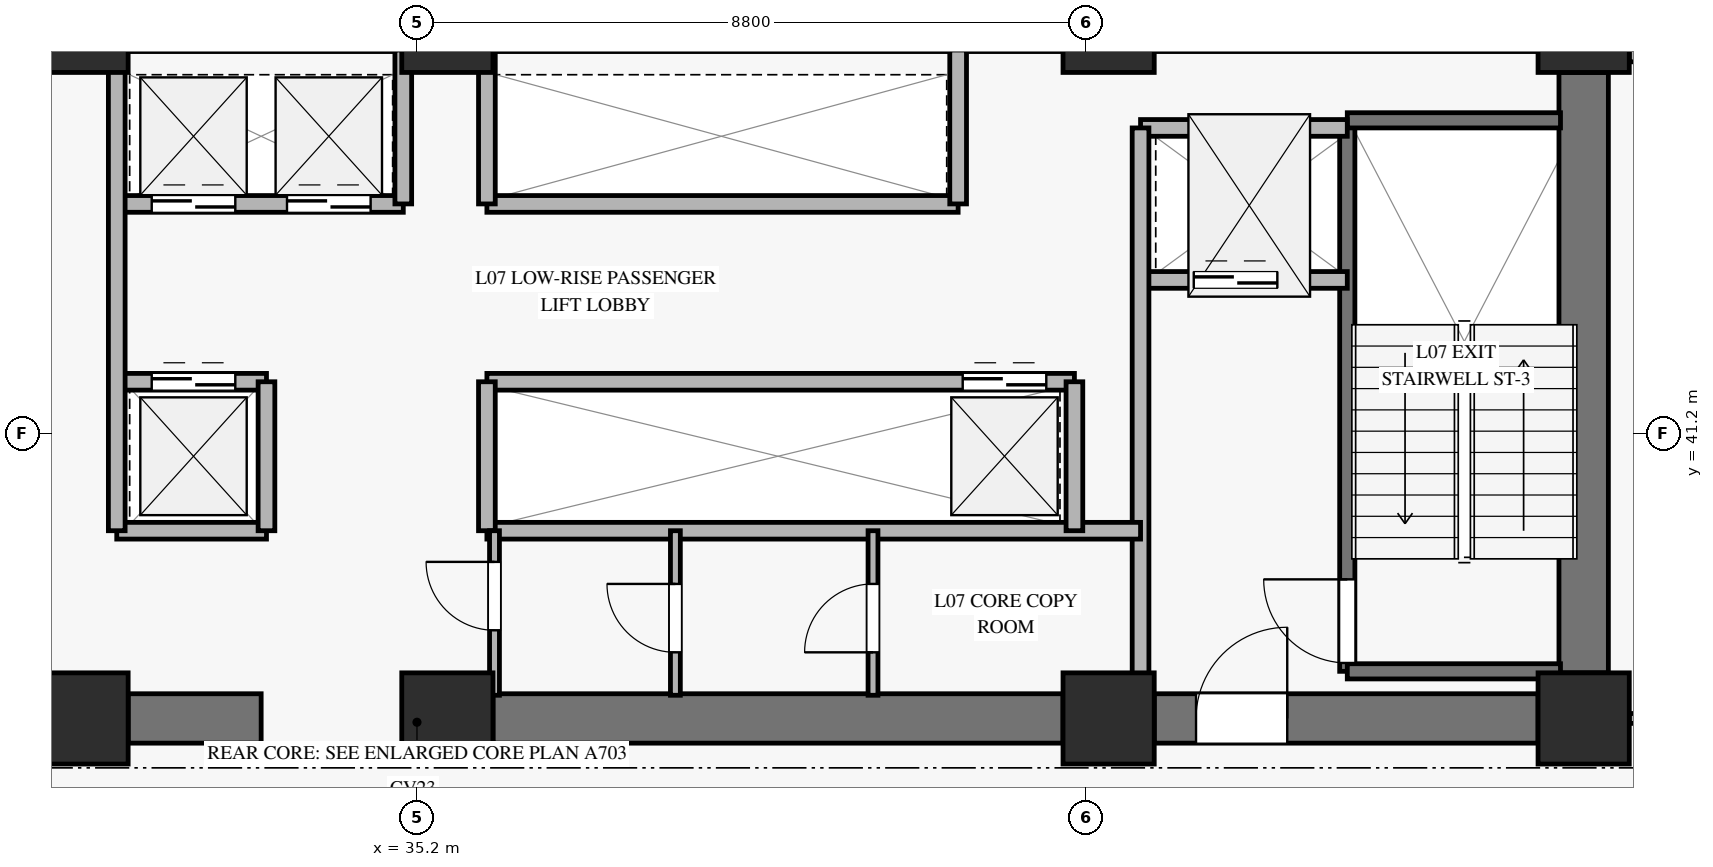
"""IFC4 building model, lengths in metres.
Left out: names, types, materials, properties, quantities, classifications, styles, units other than length and angle.
Written with IfcOpenShell. Run it as: python <this file> out.ifc"""

import sys

from ifc_helpers import new_model, si_unit, direction, frame, frame_2d, origin, origin_2d, place, context, subcontext, project, spatial, rectangle, extrude, source, transform, mapped, element, fill, save


model = new_model("IFC4")
c1 = context("Model", 3, precision=1e-05, world=origin(), true_north=direction((0.0, 1.0)))
c2 = subcontext(c1, "Body", "Model", "MODEL_VIEW")
j1 = project(units=[si_unit("LENGTHUNIT", "METRE"), si_unit("PLANEANGLEUNIT", "RADIAN")], contexts=[c1])
p1 = place(None, origin())
s1 = spatial("IfcSite", under=j1, at=p1, CompositionType="ELEMENT")
p2 = place(p1, origin())
s2 = spatial("IfcBuilding", under=s1, at=p2, CompositionType="ELEMENT")
p3 = place(p2, frame((0.0, 0.0, 29.3)))
s3 = spatial("IfcBuildingStorey", under=s2, at=p3, CompositionType="ELEMENT", Elevation=29.3)
m1 = source(origin(), c2, "Body", "SweptSolid", [
    extrude(rectangle(XDim=1.2, YDim=1.2, at=origin_2d()), origin(), (0.0, 0.0, 1.0), 3.68),
])
for number, where, z_axis, x_axis in (
    (1, (30.8, 37.45, 0.0), (0.0, 0.0, 1.0), (1.0, 0.0, 0.0)),
    (2, (30.8, 46.55, 0.0), (0.0, 0.0, 1.0), (1.0, 0.0, 0.0)),
    (3, (35.6, 37.45, 0.0), (0.0, 0.0, 1.0), (1.0, 0.0, 0.0)),
    (4, (35.6, 46.55, 0.0), (0.0, 0.0, 1.0), (1.0, 0.0, 0.0)),
    (5, (44.3, 37.45, 0.0), (0.0, 0.0, 1.0), (1.0, 0.0, 0.0)),
    (6, (44.3, 46.55, 0.0), (0.0, 0.0, 1.0), (1.0, 0.0, 0.0)),
    (7, (50.55, 37.45, 0.0), (0.0, 0.0, 1.0), (1.0, 0.0, 0.0)),
    (8, (50.55, 46.55, 0.0), (0.0, 0.0, 1.0), (1.0, 0.0, 0.0)),
):
    element("IfcColumn", number, at=place(p3, frame(where, z_axis=z_axis, x_axis=x_axis)), inside=s3, PredefinedType="PILASTER", context=c2, shape_type="MappedRepresentation", body=[
        mapped(m1, transform((0.0, 0.0, 0.0), x_axis=(1.0, 0.0, 0.0), y_axis=(0.0, 1.0, 0.0), z_axis=(0.0, 0.0, 1.0), scale=1.0)),
    ])
p4 = place(p3, frame((31.4, 37.45, 0.0), z_axis=(0.0, 0.0, 1.0), x_axis=(1.0, 0.0, 0.0)))
e9 = element("IfcWall", 9, at=p4, inside=s3, PredefinedType="SHEAR", context=c2, shape_type="SweptSolid", body=[
    extrude(rectangle(XDim=1.75, YDim=0.65, at=frame_2d((0.875, 0.0))), origin(), (0.0, 0.0, 1.0), 3.68),
])
p5 = place(p3, frame((36.2, 37.45, 0.0), z_axis=(0.0, 0.0, 1.0), x_axis=(1.0, 0.0, 0.0)))
e10 = element("IfcWall", 10, at=p5, inside=s3, PredefinedType="SHEAR", context=c2, shape_type="SweptSolid", body=[
    extrude(rectangle(XDim=7.5, YDim=0.65, at=frame_2d((3.75, 0.0))), origin(), (0.0, 0.0, 1.0), 3.68),
])
p6 = place(p3, frame((44.9, 37.45, 0.0), z_axis=(0.0, 0.0, 1.0), x_axis=(1.0, 0.0, 0.0)))
e11 = element("IfcWall", 11, at=p6, inside=s3, PredefinedType="SHEAR", context=c2, shape_type="SweptSolid", body=[
    extrude(rectangle(XDim=5.05, YDim=0.65, at=frame_2d((2.525, 0.0))), origin(), (0.0, 0.0, 1.0), 3.68),
])
p7 = place(p6, frame((0.55, 0.0, 0.0)))
e12 = element("IfcOpeningElement", 12, at=p7, cuts=e11, PredefinedType="OPENING", context=c2, shape_type="SweptSolid", body=[
    extrude(rectangle(XDim=1.2, YDim=2.15, at=frame_2d((0.6, 1.075))), frame((0.0, 0.335, 0.0), z_axis=(0.0, -1.0, 0.0), x_axis=(1.0, 0.0, 0.0)), (0.0, 0.0, 1.0), 0.67),
])
p8 = place(p3, frame((50.55, 38.05, 0.0), z_axis=(0.0, 0.0, 1.0), x_axis=(0.0, 1.0, 0.0)))
e13 = element("IfcWall", 13, at=p8, inside=s3, PredefinedType="SHEAR", context=c2, shape_type="SweptSolid", body=[
    extrude(rectangle(XDim=7.9, YDim=0.65, at=frame_2d((3.95, 0.0))), origin(), (0.0, 0.0, 1.0), 3.68),
])
p9 = place(p3, frame((51.15, 46.25, 0.0), z_axis=(0.0, 0.0, 1.0), x_axis=(1.0, 0.0, 0.0)))
e14 = element("IfcWall", 14, at=p9, inside=s3, PredefinedType="SOLIDWALL", context=c2, shape_type="SweptSolid", body=[
    extrude(rectangle(XDim=12.4, YDim=0.32, at=frame_2d((6.2, 0.0))), origin(), (0.0, 0.0, 1.0), 3.16),
])
p10 = place(p9, frame((5.4, 0.0, 0.45)))
e15 = element("IfcOpeningElement", 15, at=p10, cuts=e14, PredefinedType="OPENING", context=c2, shape_type="SweptSolid", body=[
    extrude(rectangle(XDim=1.6, YDim=2.0, at=frame_2d((0.8, 1.0))), frame((0.0, 0.17, 0.0), z_axis=(0.0, -1.0, 0.0), x_axis=(1.0, 0.0, 0.0)), (0.0, 0.0, 1.0), 0.34),
])
p11 = place(p3, frame((47.44, 38.07, 0.0), z_axis=(0.0, 0.0, 1.0), x_axis=(0.0, 1.0, 0.0)))
e16 = element("IfcWall", 16, at=p11, inside=s3, PredefinedType="SOLIDWALL", context=c2, shape_type="SweptSolid", body=[
    extrude(rectangle(XDim=7.25, YDim=0.2, at=frame_2d((3.625, 0.0))), origin(), (0.0, 0.0, 1.0), 3.9),
])
p12 = place(p11, frame((0.11, 0.0, 0.0)))
e17 = element("IfcOpeningElement", 17, at=p12, cuts=e16, PredefinedType="OPENING", context=c2, shape_type="SweptSolid", body=[
    extrude(rectangle(XDim=1.1, YDim=2.15, at=frame_2d((0.55, 1.075))), frame((0.0, 0.11, 0.0), z_axis=(0.0, -1.0, 0.0), x_axis=(1.0, 0.0, 0.0)), (0.0, 0.0, 1.0), 0.22),
])
for number, where, z_axis, x_axis in (
    (18, (47.44, 45.32, 0.0), (0.0, 0.0, 1.0), (1.0, 0.0, 0.0)),
    (19, (47.44, 38.07, 0.0), (0.0, 0.0, 1.0), (1.0, 0.0, 0.0)),
):
    element("IfcWall", number, at=place(p3, frame(where, z_axis=z_axis, x_axis=x_axis)), inside=s3, PredefinedType="SOLIDWALL", context=c2, shape_type="SweptSolid", body=[
        extrude(rectangle(XDim=2.805, YDim=0.2, at=frame_2d((1.403, 0.0))), origin(), (0.0, 0.0, 1.0), 3.9),
    ])
p13 = place(p3, frame((44.72, 43.22, 0.0), z_axis=(0.0, 0.0, 1.0), x_axis=(1.0, 0.0, 0.0)))
e20 = element("IfcWall", 20, at=p13, inside=s3, PredefinedType="SOLIDWALL", context=c2, shape_type="SweptSolid", body=[
    extrude(rectangle(XDim=2.72, YDim=0.22, at=frame_2d((1.36, 0.0))), origin(), (0.0, 0.0, 1.0), 3.68),
])
p14 = place(p13, frame((0.7, 0.0, 0.0)))
e21 = element("IfcOpeningElement", 21, at=p14, cuts=e20, PredefinedType="OPENING", context=c2, shape_type="SweptSolid", body=[
    extrude(rectangle(XDim=1.1, YDim=2.2, at=frame_2d((0.55, 1.1))), frame((0.0, 0.12, 0.0), z_axis=(0.0, -1.0, 0.0), x_axis=(1.0, 0.0, 0.0)), (0.0, 0.0, 1.0), 0.24),
])
p15 = place(p3, frame((44.72, 45.22, 0.0), z_axis=(0.0, 0.0, 1.0), x_axis=(1.0, 0.0, 0.0)))
e22 = element("IfcWall", 22, at=p15, inside=s3, PredefinedType="SOLIDWALL", context=c2, shape_type="SweptSolid", body=[
    extrude(rectangle(XDim=2.72, YDim=0.22, at=frame_2d((1.36, 0.0))), origin(), (0.0, 0.0, 1.0), 3.68),
])
p16 = place(p3, frame((44.72, 37.755, 0.0), z_axis=(0.0, 0.0, 1.0), x_axis=(0.0, 1.0, 0.0)))
e23 = element("IfcWall", 23, at=p16, inside=s3, PredefinedType="SOLIDWALL", context=c2, shape_type="SweptSolid", body=[
    extrude(rectangle(XDim=7.465, YDim=0.22, at=frame_2d((3.732, 0.0))), origin(), (0.0, 0.0, 1.0), 3.68),
])
p17 = place(p3, frame((31.25, 44.22, 0.0), z_axis=(0.0, 0.0, 1.0), x_axis=(1.0, 0.0, 0.0)))
e24 = element("IfcWall", 24, at=p17, inside=s3, PredefinedType="SOLIDWALL", context=c2, shape_type="SweptSolid", body=[
    extrude(rectangle(XDim=3.77, YDim=0.22, at=frame_2d((1.885, 0.0))), origin(), (0.0, 0.0, 1.0), 3.68),
])
p18 = place(p17, frame((0.46, 0.0, 0.0)))
e25 = element("IfcOpeningElement", 25, at=p18, cuts=e24, PredefinedType="OPENING", context=c2, shape_type="SweptSolid", body=[
    extrude(rectangle(XDim=1.1, YDim=2.2, at=frame_2d((0.55, 1.1))), frame((0.0, 0.12, 0.0), z_axis=(0.0, -1.0, 0.0), x_axis=(1.0, 0.0, 0.0)), (0.0, 0.0, 1.0), 0.24),
])
p19 = place(p17, frame((2.24, 0.0, 0.0)))
e26 = element("IfcOpeningElement", 26, at=p19, cuts=e24, PredefinedType="OPENING", context=c2, shape_type="SweptSolid", body=[
    extrude(rectangle(XDim=1.1, YDim=2.2, at=frame_2d((0.55, 1.1))), frame((0.0, 0.12, 0.0), z_axis=(0.0, -1.0, 0.0), x_axis=(1.0, 0.0, 0.0)), (0.0, 0.0, 1.0), 0.24),
])
p20 = place(p3, frame((36.12, 44.22, 0.0), z_axis=(0.0, 0.0, 1.0), x_axis=(1.0, 0.0, 0.0)))
e27 = element("IfcWall", 27, at=p20, inside=s3, PredefinedType="SOLIDWALL", context=c2, shape_type="SweptSolid", body=[
    extrude(rectangle(XDim=6.2, YDim=0.22, at=frame_2d((3.1, 0.0))), origin(), (0.0, 0.0, 1.0), 3.68),
])
for number, where, z_axis, x_axis in (
    (28, (35.02, 44.22, 0.0), (0.0, 0.0, 1.0), (0.0, 1.0, 0.0)),
    (29, (36.12, 44.22, 0.0), (0.0, 0.0, 1.0), (0.0, 1.0, 0.0)),
    (30, (42.32, 44.22, 0.0), (0.0, 0.0, 1.0), (0.0, 1.0, 0.0)),
):
    element("IfcWall", number, at=place(p3, frame(where, z_axis=z_axis, x_axis=x_axis)), inside=s3, PredefinedType="SOLIDWALL", context=c2, shape_type="SweptSolid", body=[
        extrude(rectangle(XDim=2.025, YDim=0.22, at=frame_2d((1.013, 0.0))), origin(), (0.0, 0.0, 1.0), 3.68),
    ])
p21 = place(p3, frame((31.25, 41.88, 0.0), z_axis=(0.0, 0.0, 1.0), x_axis=(1.0, 0.0, 0.0)))
e31 = element("IfcWall", 31, at=p21, inside=s3, PredefinedType="SOLIDWALL", context=c2, shape_type="SweptSolid", body=[
    extrude(rectangle(XDim=1.97, YDim=0.22, at=frame_2d((0.985, 0.0))), origin(), (0.0, 0.0, 1.0), 3.68),
])
p22 = place(p21, frame((0.46, 0.0, 0.0)))
e32 = element("IfcOpeningElement", 32, at=p22, cuts=e31, PredefinedType="OPENING", context=c2, shape_type="SweptSolid", body=[
    extrude(rectangle(XDim=1.1, YDim=2.2, at=frame_2d((0.55, 1.1))), frame((0.0, 0.12, 0.0), z_axis=(0.0, -1.0, 0.0), x_axis=(1.0, 0.0, 0.0)), (0.0, 0.0, 1.0), 0.24),
])
p23 = place(p3, frame((36.12, 41.88, 0.0), z_axis=(0.0, 0.0, 1.0), x_axis=(1.0, 0.0, 0.0)))
e33 = element("IfcWall", 33, at=p23, inside=s3, PredefinedType="SOLIDWALL", context=c2, shape_type="SweptSolid", body=[
    extrude(rectangle(XDim=7.73, YDim=0.22, at=frame_2d((3.865, 0.0))), origin(), (0.0, 0.0, 1.0), 3.68),
])
p24 = place(p23, frame((6.26, 0.0, 0.0)))
e34 = element("IfcOpeningElement", 34, at=p24, cuts=e33, PredefinedType="OPENING", context=c2, shape_type="SweptSolid", body=[
    extrude(rectangle(XDim=1.1, YDim=2.2, at=frame_2d((0.55, 1.1))), frame((0.0, 0.12, 0.0), z_axis=(0.0, -1.0, 0.0), x_axis=(1.0, 0.0, 0.0)), (0.0, 0.0, 1.0), 0.24),
])
p25 = place(p3, frame((31.25, 39.92, 0.0), z_axis=(0.0, 0.0, 1.0), x_axis=(1.0, 0.0, 0.0)))
e35 = element("IfcWall", 35, at=p25, inside=s3, PredefinedType="SOLIDWALL", context=c2, shape_type="SweptSolid", body=[
    extrude(rectangle(XDim=1.97, YDim=0.22, at=frame_2d((0.985, 0.0))), origin(), (0.0, 0.0, 1.0), 3.68),
])
p26 = place(p3, frame((33.22, 39.92, 0.0), z_axis=(0.0, 0.0, 1.0), x_axis=(0.0, 1.0, 0.0)))
e36 = element("IfcWall", 36, at=p26, inside=s3, PredefinedType="SOLIDWALL", context=c2, shape_type="SweptSolid", body=[
    extrude(rectangle(XDim=1.96, YDim=0.22, at=frame_2d((0.98, 0.0))), origin(), (0.0, 0.0, 1.0), 3.68),
])
p27 = place(p3, frame((36.12, 39.92, 0.0), z_axis=(0.0, 0.0, 1.0), x_axis=(1.0, 0.0, 0.0)))
e37 = element("IfcWall", 37, at=p27, inside=s3, PredefinedType="SOLIDWALL", context=c2, shape_type="SweptSolid", body=[
    extrude(rectangle(XDim=8.6, YDim=0.22, at=frame_2d((4.3, 0.0))), origin(), (0.0, 0.0, 1.0), 2.965),
])
p28 = place(p3, frame((36.12, 39.92, 0.0), z_axis=(0.0, 0.0, 1.0), x_axis=(0.0, 1.0, 0.0)))
e38 = element("IfcWall", 38, at=p28, inside=s3, PredefinedType="SOLIDWALL", context=c2, shape_type="SweptSolid", body=[
    extrude(rectangle(XDim=1.96, YDim=0.22, at=frame_2d((0.98, 0.0))), origin(), (0.0, 0.0, 1.0), 3.68),
])
p29 = place(p3, frame((31.25, 39.92, 0.0), z_axis=(0.0, 0.0, 1.0), x_axis=(0.0, 1.0, 0.0)))
e39 = element("IfcWall", 39, at=p29, inside=s3, PredefinedType="SOLIDWALL", context=c2, shape_type="SweptSolid", body=[
    extrude(rectangle(XDim=6.325, YDim=0.22, at=frame_2d((3.163, 0.0))), origin(), (0.0, 0.0, 1.0), 3.68),
])
p30 = place(p3, frame((43.85, 39.92, 0.0), z_axis=(0.0, 0.0, 1.0), x_axis=(0.0, 1.0, 0.0)))
e40 = element("IfcWall", 40, at=p30, inside=s3, PredefinedType="SOLIDWALL", context=c2, shape_type="SweptSolid", body=[
    extrude(rectangle(XDim=1.96, YDim=0.22, at=frame_2d((0.98, 0.0))), origin(), (0.0, 0.0, 1.0), 3.68),
])
p31 = place(p3, frame((36.22, 37.755, 0.0), z_axis=(0.0, 0.0, 1.0), x_axis=(0.0, 1.0, 0.0)))
e41 = element("IfcWall", 41, at=p31, inside=s3, PredefinedType="PARTITIONING", context=c2, shape_type="SweptSolid", body=[
    extrude(rectangle(XDim=2.165, YDim=0.13, at=frame_2d((1.083, 0.0))), origin(), (0.0, 0.0, 1.0), 3.68),
])
p32 = place(p31, frame((0.855, 0.0, 0.0)))
e42 = element("IfcOpeningElement", 42, at=p32, cuts=e41, PredefinedType="OPENING", context=c2, shape_type="SweptSolid", body=[
    extrude(rectangle(XDim=0.9, YDim=2.1, at=frame_2d((0.45, 1.05))), frame((0.0, 0.075, 0.0), z_axis=(0.0, -1.0, 0.0), x_axis=(1.0, 0.0, 0.0)), (0.0, 0.0, 1.0), 0.15),
])
p33 = place(p3, frame((38.6, 37.755, 0.0), z_axis=(0.0, 0.0, 1.0), x_axis=(0.0, 1.0, 0.0)))
e43 = element("IfcWall", 43, at=p33, inside=s3, PredefinedType="PARTITIONING", context=c2, shape_type="SweptSolid", body=[
    extrude(rectangle(XDim=2.165, YDim=0.13, at=frame_2d((1.083, 0.0))), origin(), (0.0, 0.0, 1.0), 3.68),
])
p34 = place(p33, frame((0.565, 0.0, 0.0)))
e44 = element("IfcOpeningElement", 44, at=p34, cuts=e43, PredefinedType="OPENING", context=c2, shape_type="SweptSolid", body=[
    extrude(rectangle(XDim=0.9, YDim=2.1, at=frame_2d((0.45, 1.05))), frame((0.0, 0.075, 0.0), z_axis=(0.0, -1.0, 0.0), x_axis=(1.0, 0.0, 0.0)), (0.0, 0.0, 1.0), 0.15),
])
p35 = place(p3, frame((41.2, 37.755, 0.0), z_axis=(0.0, 0.0, 1.0), x_axis=(0.0, 1.0, 0.0)))
e45 = element("IfcWall", 45, at=p35, inside=s3, PredefinedType="PARTITIONING", context=c2, shape_type="SweptSolid", body=[
    extrude(rectangle(XDim=2.165, YDim=0.13, at=frame_2d((1.083, 0.0))), origin(), (0.0, 0.0, 1.0), 3.68),
])
p36 = place(p35, frame((0.565, 0.0, 0.0)))
e46 = element("IfcOpeningElement", 46, at=p36, cuts=e45, PredefinedType="OPENING", context=c2, shape_type="SweptSolid", body=[
    extrude(rectangle(XDim=0.9, YDim=2.1, at=frame_2d((0.45, 1.05))), frame((0.0, 0.075, 0.0), z_axis=(0.0, -1.0, 0.0), x_axis=(1.0, 0.0, 0.0)), (0.0, 0.0, 1.0), 0.15),
])
p37 = place(p3, frame((51.15, 37.45, 0.0), z_axis=(0.0, 0.0, 1.0), x_axis=(1.0, 0.0, 0.0)))
e47 = element("IfcWall", 47, at=p37, inside=s3, PredefinedType="PARTITIONING", context=c2, shape_type="SweptSolid", body=[
    extrude(rectangle(XDim=16.15, YDim=0.13, at=frame_2d((8.075, 0.0))), origin(), (0.0, 0.0, 1.0), 3.165),
])
p38 = place(p37, frame((0.5, 0.0, 0.0)))
e48 = element("IfcOpeningElement", 48, at=p38, cuts=e47, PredefinedType="OPENING", context=c2, shape_type="SweptSolid", body=[
    extrude(rectangle(XDim=0.9, YDim=2.1, at=frame_2d((0.45, 1.05))), frame((0.0, 0.075, 0.0), z_axis=(0.0, -1.0, 0.0), x_axis=(1.0, 0.0, 0.0)), (0.0, 0.0, 1.0), 0.15),
])
p39 = place(p37, frame((11.745, 0.0, 0.0)))
e49 = element("IfcOpeningElement", 49, at=p39, cuts=e47, PredefinedType="OPENING", context=c2, shape_type="SweptSolid", body=[
    extrude(rectangle(XDim=0.95, YDim=2.1, at=frame_2d((0.475, 1.05))), frame((0.0, 0.075, 0.0), z_axis=(0.0, -1.0, 0.0), x_axis=(1.0, 0.0, 0.0)), (0.0, 0.0, 1.0), 0.15),
])
m2 = source(origin(), c2, "Body", "SweptSolid", [
    extrude(rectangle(XDim=1.1, YDim=2.15, at=frame_2d((0.55, 1.075))), frame((0.0, 0.025, 0.0), z_axis=(0.0, -1.0, 0.0), x_axis=(1.0, 0.0, 0.0)), (0.0, 0.0, 1.0), 0.05),
])
p40 = place(p12, origin())
e50 = element("IfcDoor", 50, at=p40, inside=s3, OperationType="SINGLE_SWING_RIGHT", PredefinedType="DOOR", context=c2, shape_type="MappedRepresentation", body=[
    mapped(m2, transform((0.0, 0.0, 0.0), x_axis=(1.0, 0.0, 0.0), y_axis=(0.0, 1.0, 0.0), z_axis=(0.0, 0.0, 1.0), scale=1.0)),
])
fill(e17, e50)
m3 = source(origin(), c2, "Body", "SweptSolid", [
    extrude(rectangle(XDim=1.1, YDim=2.2, at=frame_2d((0.55, 1.1))), frame((0.0, 0.025, 0.0), z_axis=(0.0, -1.0, 0.0), x_axis=(1.0, 0.0, 0.0)), (0.0, 0.0, 1.0), 0.05),
])
p41 = place(p14, origin())
e51 = element("IfcDoor", 51, at=p41, inside=s3, OperationType="SLIDING_TO_LEFT", PredefinedType="DOOR", context=c2, shape_type="MappedRepresentation", body=[
    mapped(m3, transform((0.0, 0.0, 0.0), x_axis=(1.0, 0.0, 0.0), y_axis=(0.0, 1.0, 0.0), z_axis=(0.0, 0.0, 1.0), scale=1.0)),
])
fill(e21, e51)
m4 = source(origin(), c2, "Body", "SweptSolid", [
    extrude(rectangle(XDim=1.2, YDim=2.15, at=frame_2d((0.6, 1.075))), frame((0.0, 0.025, 0.0), z_axis=(0.0, -1.0, 0.0), x_axis=(1.0, 0.0, 0.0)), (0.0, 0.0, 1.0), 0.05),
])
p42 = place(p7, origin())
e52 = element("IfcDoor", 52, at=p42, inside=s3, OperationType="SINGLE_SWING_RIGHT", PredefinedType="DOOR", context=c2, shape_type="MappedRepresentation", body=[
    mapped(m4, transform((0.0, 0.0, 0.0), x_axis=(1.0, 0.0, 0.0), y_axis=(0.0, 1.0, 0.0), z_axis=(0.0, 0.0, 1.0), scale=1.0)),
])
fill(e12, e52)
p43 = place(p18, origin())
e53 = element("IfcDoor", 53, at=p43, inside=s3, OperationType="SLIDING_TO_LEFT", PredefinedType="DOOR", context=c2, shape_type="MappedRepresentation", body=[
    mapped(m3, transform((0.0, 0.0, 0.0), x_axis=(1.0, 0.0, 0.0), y_axis=(0.0, 1.0, 0.0), z_axis=(0.0, 0.0, 1.0), scale=1.0)),
])
fill(e25, e53)
p44 = place(p19, origin())
e54 = element("IfcDoor", 54, at=p44, inside=s3, OperationType="SLIDING_TO_LEFT", PredefinedType="DOOR", context=c2, shape_type="MappedRepresentation", body=[
    mapped(m3, transform((0.0, 0.0, 0.0), x_axis=(1.0, 0.0, 0.0), y_axis=(0.0, 1.0, 0.0), z_axis=(0.0, 0.0, 1.0), scale=1.0)),
])
fill(e26, e54)
p45 = place(p22, origin())
e55 = element("IfcDoor", 55, at=p45, inside=s3, OperationType="SLIDING_TO_LEFT", PredefinedType="DOOR", context=c2, shape_type="MappedRepresentation", body=[
    mapped(m3, transform((0.0, 0.0, 0.0), x_axis=(1.0, 0.0, 0.0), y_axis=(0.0, 1.0, 0.0), z_axis=(0.0, 0.0, 1.0), scale=1.0)),
])
fill(e32, e55)
p46 = place(p24, origin())
e56 = element("IfcDoor", 56, at=p46, inside=s3, OperationType="SLIDING_TO_LEFT", PredefinedType="DOOR", context=c2, shape_type="MappedRepresentation", body=[
    mapped(m3, transform((0.0, 0.0, 0.0), x_axis=(1.0, 0.0, 0.0), y_axis=(0.0, 1.0, 0.0), z_axis=(0.0, 0.0, 1.0), scale=1.0)),
])
fill(e34, e56)
m5 = source(origin(), c2, "Body", "SweptSolid", [
    extrude(rectangle(XDim=0.9, YDim=2.1, at=frame_2d((0.45, 1.05))), frame((0.0, 0.025, 0.0), z_axis=(0.0, -1.0, 0.0), x_axis=(1.0, 0.0, 0.0)), (0.0, 0.0, 1.0), 0.05),
])
p47 = place(p32, origin())
e57 = element("IfcDoor", 57, at=p47, inside=s3, OperationType="SINGLE_SWING_RIGHT", PredefinedType="DOOR", context=c2, shape_type="MappedRepresentation", body=[
    mapped(m5, transform((0.0, 0.0, 0.0), x_axis=(1.0, 0.0, 0.0), y_axis=(0.0, 1.0, 0.0), z_axis=(0.0, 0.0, 1.0), scale=1.0)),
])
fill(e42, e57)
p48 = place(p34, origin())
e58 = element("IfcDoor", 58, at=p48, inside=s3, OperationType="SINGLE_SWING_RIGHT", PredefinedType="DOOR", context=c2, shape_type="MappedRepresentation", body=[
    mapped(m5, transform((0.0, 0.0, 0.0), x_axis=(1.0, 0.0, 0.0), y_axis=(0.0, 1.0, 0.0), z_axis=(0.0, 0.0, 1.0), scale=1.0)),
])
fill(e44, e58)
p49 = place(p36, origin())
e59 = element("IfcDoor", 59, at=p49, inside=s3, OperationType="SINGLE_SWING_LEFT", PredefinedType="DOOR", context=c2, shape_type="MappedRepresentation", body=[
    mapped(m5, transform((0.0, 0.0, 0.0), x_axis=(1.0, 0.0, 0.0), y_axis=(0.0, 1.0, 0.0), z_axis=(0.0, 0.0, 1.0), scale=1.0)),
])
fill(e46, e59)
save(model, sys.argv[1])
